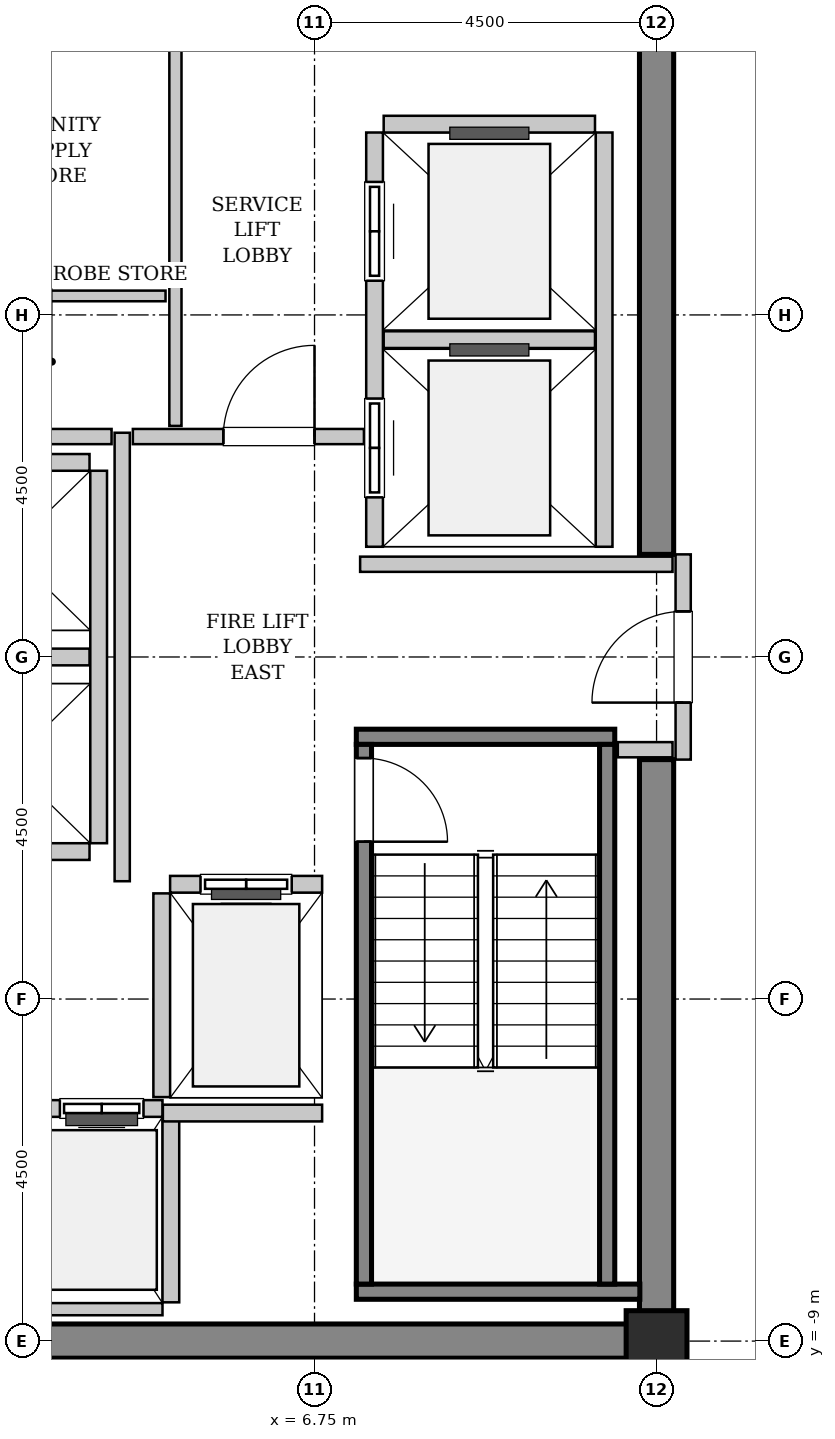
"""IFC4 building model, lengths in metres.
Left out: names, types, materials, properties, quantities, classifications, styles, units other than length and angle.
Written with IfcOpenShell. Run it as: python <this file> out.ifc"""

import sys

from ifc_helpers import new_model, si_unit, direction, frame, frame_2d, origin, origin_2d, place, context, subcontext, project, spatial, rectangle, hollow_rectangle, extrude, source, transform, mapped, element, fill, save


model = new_model("IFC4")
c1 = context("Model", 3, precision=1e-05, world=origin(), true_north=direction((0.0, 1.0)))
c2 = subcontext(c1, "Body", "Model", "MODEL_VIEW")
j1 = project(units=[si_unit("LENGTHUNIT", "METRE"), si_unit("PLANEANGLEUNIT", "RADIAN")], contexts=[c1])
p1 = place(None, origin())
s1 = spatial("IfcSite", under=j1, at=p1, CompositionType="ELEMENT")
p2 = place(p1, origin())
s2 = spatial("IfcBuilding", under=s1, at=p2, CompositionType="ELEMENT")
p3 = place(p2, frame((0.0, 0.0, 237.0)))
s3 = spatial("IfcBuildingStorey", under=s2, at=p3, CompositionType="ELEMENT", Elevation=237.0)
m1 = source(origin(), c2, "Body", "SweptSolid", [
    extrude(rectangle(XDim=9.925, YDim=0.45, at=frame_2d((4.962, 0.0))), origin(), (0.0, 0.0, 1.0), 3.8),
])
p4 = place(p3, frame((1.55, -9.0, 0.0), z_axis=(0.0, 0.0, 1.0), x_axis=(1.0, 0.0, 0.0)))
e1 = element("IfcWall", 1, at=p4, inside=s3, PredefinedType="SHEAR", context=c2, shape_type="MappedRepresentation", body=[
    mapped(m1, transform((0.0, 0.0, 0.0), x_axis=(1.0, 0.0, 0.0), y_axis=(0.0, 1.0, 0.0), z_axis=(0.0, 0.0, 1.0), scale=1.0)),
])
m2 = source(origin(), c2, "Body", "SweptSolid", [
    extrude(rectangle(XDim=7.425, YDim=0.45, at=frame_2d((3.712, 0.0))), origin(), (0.0, 0.0, 1.0), 3.8),
])
for number, where, z_axis, x_axis in (
    (2, (11.25, -8.775, 0.0), (0.0, 0.0, 1.0), (0.0, 1.0, 0.0)),
    (3, (11.25, 1.35, 0.0), (0.0, 0.0, 1.0), (0.0, 1.0, 0.0)),
):
    element("IfcWall", number, at=place(p3, frame(where, z_axis=z_axis, x_axis=x_axis)), inside=s3, PredefinedType="SHEAR", context=c2, shape_type="MappedRepresentation", body=[
        mapped(m2, transform((0.0, 0.0, 0.0), x_axis=(1.0, 0.0, 0.0), y_axis=(0.0, 1.0, 0.0), z_axis=(0.0, 0.0, 1.0), scale=1.0)),
    ])
m3 = source(origin(), c2, "Body", "SweptSolid", [
    extrude(hollow_rectangle(XDim=0.8, YDim=0.8, WallThickness=0.04, InnerFilletRadius=0.04, OuterFilletRadius=0.08, at=origin_2d()), origin(), (0.0, 0.0, 1.0), 3.8),
])
p5 = place(p3, frame((11.25, -9.0, 0.0), z_axis=(0.0, 0.0, 1.0), x_axis=(1.0, 0.0, 0.0)))
e4 = element("IfcColumn", 4, at=p5, inside=s3, PredefinedType="COLUMN", context=c2, shape_type="MappedRepresentation", body=[
    mapped(m3, transform((0.0, 0.0, 0.0), x_axis=(1.0, 0.0, 0.0), y_axis=(0.0, 1.0, 0.0), z_axis=(0.0, 0.0, 1.0), scale=1.0)),
])
m4 = source(origin(), c2, "Body", "SweptSolid", [
    extrude(rectangle(XDim=3.4, YDim=0.2, at=frame_2d((1.7, 0.0))), origin(), (0.0, 0.0, 1.0), 3.8),
])
p6 = place(p3, frame((7.3, -1.05, 0.0), z_axis=(0.0, 0.0, 1.0), x_axis=(1.0, 0.0, 0.0)))
e5 = element("IfcWall", 5, at=p6, inside=s3, PredefinedType="SOLIDWALL", context=c2, shape_type="MappedRepresentation", body=[
    mapped(m4, transform((0.0, 0.0, 0.0), x_axis=(1.0, 0.0, 0.0), y_axis=(0.0, 1.0, 0.0), z_axis=(0.0, 0.0, 1.0), scale=1.0)),
])
m5 = source(origin(), c2, "Body", "SweptSolid", [
    extrude(rectangle(XDim=3.73, YDim=0.2, at=frame_2d((1.865, 0.0))), origin(), (0.0, 0.0, 1.0), 3.8),
])
p7 = place(p3, frame((7.3, -8.35, 0.0), z_axis=(0.0, 0.0, 1.0), x_axis=(1.0, 0.0, 0.0)))
e6 = element("IfcWall", 6, at=p7, inside=s3, PredefinedType="SOLIDWALL", context=c2, shape_type="MappedRepresentation", body=[
    mapped(m5, transform((0.0, 0.0, 0.0), x_axis=(1.0, 0.0, 0.0), y_axis=(0.0, 1.0, 0.0), z_axis=(0.0, 0.0, 1.0), scale=1.0)),
])
m6 = source(origin(), c2, "Body", "SweptSolid", [
    extrude(rectangle(XDim=7.1, YDim=0.2, at=frame_2d((3.55, 0.0))), origin(), (0.0, 0.0, 1.0), 3.8),
])
p8 = place(p3, frame((7.4, -1.15, 0.0), z_axis=(0.0, 0.0, 1.0), x_axis=(0.0, -1.0, 0.0)))
e7 = element("IfcWall", 7, at=p8, inside=s3, PredefinedType="SOLIDWALL", context=c2, shape_type="MappedRepresentation", body=[
    mapped(m6, transform((0.0, 0.0, 0.0), x_axis=(1.0, 0.0, 0.0), y_axis=(0.0, 1.0, 0.0), z_axis=(0.0, 0.0, 1.0), scale=1.0)),
])
p9 = place(p8, frame((0.18, 0.0, 0.0)))
e8 = element("IfcOpeningElement", 8, at=p9, cuts=e7, PredefinedType="OPENING", context=c2, shape_type="SweptSolid", body=[
    extrude(rectangle(XDim=1.1, YDim=2.15, at=frame_2d((0.55, 1.075))), frame((0.0, 0.11, 0.0), z_axis=(0.0, -1.0, 0.0), x_axis=(1.0, 0.0, 0.0)), (0.0, 0.0, 1.0), 0.22),
])
p10 = place(p3, frame((10.6, -1.15, 0.0), z_axis=(0.0, 0.0, 1.0), x_axis=(0.0, -1.0, 0.0)))
e9 = element("IfcWall", 9, at=p10, inside=s3, PredefinedType="SOLIDWALL", context=c2, shape_type="MappedRepresentation", body=[
    mapped(m6, transform((0.0, 0.0, 0.0), x_axis=(1.0, 0.0, 0.0), y_axis=(0.0, 1.0, 0.0), z_axis=(0.0, 0.0, 1.0), scale=1.0)),
])
m7 = source(origin(), c2, "Body", "SweptSolid", [
    extrude(rectangle(XDim=2.0, YDim=0.22, at=frame_2d((1.0, 0.0))), origin(), (0.0, 0.0, 1.0), 3.535),
])
p11 = place(p3, frame((6.85, -2.99, 0.0), z_axis=(0.0, 0.0, 1.0), x_axis=(-1.0, 0.0, 0.0)))
e10 = element("IfcWall", 10, at=p11, inside=s3, PredefinedType="SOLIDWALL", context=c2, shape_type="MappedRepresentation", body=[
    mapped(m7, transform((0.0, 0.0, 0.0), x_axis=(1.0, 0.0, 0.0), y_axis=(0.0, 1.0, 0.0), z_axis=(0.0, 0.0, 1.0), scale=1.0)),
])
p12 = place(p11, frame((0.4, 0.0, 0.0)))
e11 = element("IfcOpeningElement", 11, at=p12, cuts=e10, PredefinedType="OPENING", context=c2, shape_type="SweptSolid", body=[
    extrude(rectangle(XDim=1.2, YDim=2.2, at=frame_2d((0.6, 1.1))), frame((0.0, 0.12, 0.0), z_axis=(0.0, -1.0, 0.0), x_axis=(1.0, 0.0, 0.0)), (0.0, 0.0, 1.0), 0.24),
])
m8 = source(origin(), c2, "Body", "SweptSolid", [
    extrude(rectangle(XDim=2.68, YDim=0.22, at=frame_2d((1.34, 0.0))), origin(), (0.0, 0.0, 1.0), 3.535),
])
p13 = place(p3, frame((4.74, -3.11, 0.0), z_axis=(0.0, 0.0, 1.0), x_axis=(0.0, -1.0, 0.0)))
e12 = element("IfcWall", 12, at=p13, inside=s3, PredefinedType="SOLIDWALL", context=c2, shape_type="MappedRepresentation", body=[
    mapped(m8, transform((0.0, 0.0, 0.0), x_axis=(1.0, 0.0, 0.0), y_axis=(0.0, 1.0, 0.0), z_axis=(0.0, 0.0, 1.0), scale=1.0)),
])
m9 = source(origin(), c2, "Body", "SweptSolid", [
    extrude(rectangle(XDim=5.45, YDim=0.22, at=frame_2d((2.725, 0.0))), origin(), (0.0, 0.0, 1.0), 3.535),
])
p14 = place(p3, frame((7.54, 6.9, 0.0), z_axis=(0.0, 0.0, 1.0), x_axis=(0.0, -1.0, 0.0)))
e13 = element("IfcWall", 13, at=p14, inside=s3, PredefinedType="SOLIDWALL", context=c2, shape_type="MappedRepresentation", body=[
    mapped(m9, transform((0.0, 0.0, 0.0), x_axis=(1.0, 0.0, 0.0), y_axis=(0.0, 1.0, 0.0), z_axis=(0.0, 0.0, 1.0), scale=1.0)),
])
p15 = place(p14, frame((3.5, 0.0, 0.0)))
e14 = element("IfcOpeningElement", 14, at=p15, cuts=e13, PredefinedType="OPENING", context=c2, shape_type="SweptSolid", body=[
    extrude(rectangle(XDim=1.3, YDim=2.3, at=frame_2d((0.65, 1.15))), frame((0.0, 0.12, 0.0), z_axis=(0.0, -1.0, 0.0), x_axis=(1.0, 0.0, 0.0)), (0.0, 0.0, 1.0), 0.24),
])
p16 = place(p14, frame((0.65, 0.0, 0.0)))
e15 = element("IfcOpeningElement", 15, at=p16, cuts=e13, PredefinedType="OPENING", context=c2, shape_type="SweptSolid", body=[
    extrude(rectangle(XDim=1.3, YDim=2.3, at=frame_2d((0.65, 1.15))), frame((0.0, 0.12, 0.0), z_axis=(0.0, -1.0, 0.0), x_axis=(1.0, 0.0, 0.0)), (0.0, 0.0, 1.0), 0.24),
])
p17 = place(p3, frame((10.56, 1.45, 0.0), z_axis=(0.0, 0.0, 1.0), x_axis=(0.0, 1.0, 0.0)))
e16 = element("IfcWall", 16, at=p17, inside=s3, PredefinedType="SOLIDWALL", context=c2, shape_type="MappedRepresentation", body=[
    mapped(m9, transform((0.0, 0.0, 0.0), x_axis=(1.0, 0.0, 0.0), y_axis=(0.0, 1.0, 0.0), z_axis=(0.0, 0.0, 1.0), scale=1.0)),
])
m10 = source(origin(), c2, "Body", "SweptSolid", [
    extrude(rectangle(XDim=2.78, YDim=0.22, at=frame_2d((1.39, 0.0))), origin(), (0.0, 0.0, 1.0), 3.535),
])
for number, where, z_axis, x_axis in (
    (17, (7.66, 4.175, 0.0), (0.0, 0.0, 1.0), (1.0, 0.0, 0.0)),
    (18, (10.44, 7.01, 0.0), (0.0, 0.0, 1.0), (-1.0, 0.0, 0.0)),
):
    element("IfcWall", number, at=place(p3, frame(where, z_axis=z_axis, x_axis=x_axis)), inside=s3, PredefinedType="SOLIDWALL", context=c2, shape_type="MappedRepresentation", body=[
        mapped(m10, transform((0.0, 0.0, 0.0), x_axis=(1.0, 0.0, 0.0), y_axis=(0.0, 1.0, 0.0), z_axis=(0.0, 0.0, 1.0), scale=1.0)),
    ])
m11 = source(origin(), c2, "Body", "SweptSolid", [
    extrude(rectangle(XDim=3.2, YDim=0.22, at=frame_2d((1.6, 0.0))), origin(), (0.0, 0.0, 1.0), 3.535),
])
p18 = place(p3, frame((4.75, -5.94, 0.0), z_axis=(0.0, 0.0, 1.0), x_axis=(-1.0, 0.0, 0.0)))
e19 = element("IfcWall", 19, at=p18, inside=s3, PredefinedType="SOLIDWALL", context=c2, shape_type="MappedRepresentation", body=[
    mapped(m11, transform((0.0, 0.0, 0.0), x_axis=(1.0, 0.0, 0.0), y_axis=(0.0, 1.0, 0.0), z_axis=(0.0, 0.0, 1.0), scale=1.0)),
])
p19 = place(p18, frame((1.875, 0.0, 0.0)))
e20 = element("IfcOpeningElement", 20, at=p19, cuts=e19, PredefinedType="OPENING", context=c2, shape_type="SweptSolid", body=[
    extrude(rectangle(XDim=1.1, YDim=2.2, at=frame_2d((0.55, 1.1))), frame((0.0, 0.12, 0.0), z_axis=(0.0, -1.0, 0.0), x_axis=(1.0, 0.0, 0.0)), (0.0, 0.0, 1.0), 0.24),
])
p20 = place(p18, frame((0.25, 0.0, 0.0)))
e21 = element("IfcOpeningElement", 21, at=p20, cuts=e19, PredefinedType="OPENING", context=c2, shape_type="SweptSolid", body=[
    extrude(rectangle(XDim=1.1, YDim=2.2, at=frame_2d((0.55, 1.1))), frame((0.0, 0.12, 0.0), z_axis=(0.0, -1.0, 0.0), x_axis=(1.0, 0.0, 0.0)), (0.0, 0.0, 1.0), 0.24),
])
m12 = source(origin(), c2, "Body", "SweptSolid", [
    extrude(rectangle(XDim=3.2, YDim=0.16, at=frame_2d((1.6, 0.0))), origin(), (0.0, 0.0, 1.0), 2.625),
])
p21 = place(p3, frame((1.55, -8.58, 0.0), z_axis=(0.0, 0.0, 1.0), x_axis=(1.0, 0.0, 0.0)))
e22 = element("IfcWall", 22, at=p21, inside=s3, PredefinedType="PARTITIONING", context=c2, shape_type="MappedRepresentation", body=[
    mapped(m12, transform((0.0, 0.0, 0.0), x_axis=(1.0, 0.0, 0.0), y_axis=(0.0, 1.0, 0.0), z_axis=(0.0, 0.0, 1.0), scale=1.0)),
])
m13 = source(origin(), c2, "Body", "SweptSolid", [
    extrude(rectangle(XDim=2.43, YDim=0.22, at=frame_2d((1.215, 0.0))), origin(), (0.0, 0.0, 1.0), 3.535),
])
p22 = place(p3, frame((4.86, -8.49, 0.0), z_axis=(0.0, 0.0, 1.0), x_axis=(0.0, 1.0, 0.0)))
e23 = element("IfcWall", 23, at=p22, inside=s3, PredefinedType="SOLIDWALL", context=c2, shape_type="MappedRepresentation", body=[
    mapped(m13, transform((0.0, 0.0, 0.0), x_axis=(1.0, 0.0, 0.0), y_axis=(0.0, 1.0, 0.0), z_axis=(0.0, 0.0, 1.0), scale=1.0)),
])
m14 = source(origin(), c2, "Body", "SweptSolid", [
    extrude(rectangle(XDim=4.9, YDim=0.22, at=frame_2d((2.45, 0.0))), origin(), (0.0, 0.0, 1.0), 3.535),
])
p23 = place(p3, frame((3.91, -2.45, 0.0), z_axis=(0.0, 0.0, 1.0), x_axis=(0.0, 1.0, 0.0)))
e24 = element("IfcWall", 24, at=p23, inside=s3, PredefinedType="SOLIDWALL", context=c2, shape_type="MappedRepresentation", body=[
    mapped(m14, transform((0.0, 0.0, 0.0), x_axis=(1.0, 0.0, 0.0), y_axis=(0.0, 1.0, 0.0), z_axis=(0.0, 0.0, 1.0), scale=1.0)),
])
m15 = source(origin(), c2, "Body", "SweptSolid", [
    extrude(rectangle(XDim=2.13, YDim=0.22, at=frame_2d((1.065, 0.0))), origin(), (0.0, 0.0, 1.0), 3.535),
])
for number, where, z_axis, x_axis in (
    (25, (1.66, -2.56, 0.0), (0.0, 0.0, 1.0), (1.0, 0.0, 0.0)),
    (26, (1.66, 0.0, 0.0), (0.0, 0.0, 1.0), (1.0, 0.0, 0.0)),
    (27, (3.79, 2.56, 0.0), (0.0, 0.0, 1.0), (-1.0, 0.0, 0.0)),
):
    element("IfcWall", number, at=place(p3, frame(where, z_axis=z_axis, x_axis=x_axis)), inside=s3, PredefinedType="SOLIDWALL", context=c2, shape_type="MappedRepresentation", body=[
        mapped(m15, transform((0.0, 0.0, 0.0), x_axis=(1.0, 0.0, 0.0), y_axis=(0.0, 1.0, 0.0), z_axis=(0.0, 0.0, 1.0), scale=1.0)),
    ])
m16 = source(origin(), c2, "Body", "SweptSolid", [
    extrude(rectangle(XDim=2.095, YDim=0.22, at=frame_2d((1.048, 0.0))), origin(), (0.0, 0.0, 1.0), 3.535),
])
p24 = place(p3, frame((4.755, -6.0, 0.0), z_axis=(0.0, 0.0, 1.0), x_axis=(1.0, 0.0, 0.0)))
e28 = element("IfcWall", 28, at=p24, inside=s3, PredefinedType="SOLIDWALL", context=c2, shape_type="MappedRepresentation", body=[
    mapped(m16, transform((0.0, 0.0, 0.0), x_axis=(1.0, 0.0, 0.0), y_axis=(0.0, 1.0, 0.0), z_axis=(0.0, 0.0, 1.0), scale=1.0)),
])
m17 = source(origin(), c2, "Body", "SweptSolid", [
    extrude(rectangle(XDim=2.7, YDim=0.2, at=frame_2d((1.35, 0.0))), origin(), (0.0, 0.0, 1.0), 2.625),
])
p25 = place(p3, frame((11.6, -1.35, 0.0), z_axis=(0.0, 0.0, 1.0), x_axis=(0.0, 1.0, 0.0)))
e29 = element("IfcWall", 29, at=p25, inside=s3, PredefinedType="PARTITIONING", context=c2, shape_type="MappedRepresentation", body=[
    mapped(m17, transform((0.0, 0.0, 0.0), x_axis=(1.0, 0.0, 0.0), y_axis=(0.0, 1.0, 0.0), z_axis=(0.0, 0.0, 1.0), scale=1.0)),
])
p26 = place(p25, frame((0.75, 0.0, 0.0)))
e30 = element("IfcOpeningElement", 30, at=p26, cuts=e29, PredefinedType="OPENING", context=c2, shape_type="SweptSolid", body=[
    extrude(rectangle(XDim=1.2, YDim=2.15, at=frame_2d((0.6, 1.075))), frame((0.0, 0.11, 0.0), z_axis=(0.0, -1.0, 0.0), x_axis=(1.0, 0.0, 0.0)), (0.0, 0.0, 1.0), 0.22),
])
m18 = source(origin(), c2, "Body", "SweptSolid", [
    extrude(rectangle(XDim=5.9, YDim=0.2, at=frame_2d((2.95, 0.0))), origin(), (0.0, 0.0, 1.0), 3.535),
])
p27 = place(p3, frame((4.22, -2.95, 0.0), z_axis=(0.0, 0.0, 1.0), x_axis=(0.0, 1.0, 0.0)))
e31 = element("IfcWall", 31, at=p27, inside=s3, PredefinedType="PARTITIONING", context=c2, shape_type="MappedRepresentation", body=[
    mapped(m18, transform((0.0, 0.0, 0.0), x_axis=(1.0, 0.0, 0.0), y_axis=(0.0, 1.0, 0.0), z_axis=(0.0, 0.0, 1.0), scale=1.0)),
])
m19 = source(origin(), c2, "Body", "SweptSolid", [
    extrude(rectangle(XDim=2.52, YDim=0.2, at=frame_2d((1.26, 0.0))), origin(), (0.0, 0.0, 1.0), 3.535),
])
p28 = place(p3, frame((1.56, 2.9, 0.0), z_axis=(0.0, 0.0, 1.0), x_axis=(1.0, 0.0, 0.0)))
e32 = element("IfcWall", 32, at=p28, inside=s3, PredefinedType="PARTITIONING", context=c2, shape_type="MappedRepresentation", body=[
    mapped(m19, transform((0.0, 0.0, 0.0), x_axis=(1.0, 0.0, 0.0), y_axis=(0.0, 1.0, 0.0), z_axis=(0.0, 0.0, 1.0), scale=1.0)),
])
m20 = source(origin(), c2, "Body", "SweptSolid", [
    extrude(rectangle(XDim=3.04, YDim=0.2, at=frame_2d((1.52, 0.0))), origin(), (0.0, 0.0, 1.0), 3.535),
])
p29 = place(p3, frame((4.36, 2.9, 0.0), z_axis=(0.0, 0.0, 1.0), x_axis=(1.0, 0.0, 0.0)))
e33 = element("IfcWall", 33, at=p29, inside=s3, PredefinedType="PARTITIONING", context=c2, shape_type="MappedRepresentation", body=[
    mapped(m20, transform((0.0, 0.0, 0.0), x_axis=(1.0, 0.0, 0.0), y_axis=(0.0, 1.0, 0.0), z_axis=(0.0, 0.0, 1.0), scale=1.0)),
])
p30 = place(p29, frame((1.19, 0.0, 0.0)))
e34 = element("IfcOpeningElement", 34, at=p30, cuts=e33, PredefinedType="OPENING", context=c2, shape_type="SweptSolid", body=[
    extrude(rectangle(XDim=1.2, YDim=2.15, at=frame_2d((0.6, 1.075))), frame((0.0, 0.11, 0.0), z_axis=(0.0, -1.0, 0.0), x_axis=(1.0, 0.0, 0.0)), (0.0, 0.0, 1.0), 0.22),
])
m21 = source(origin(), c2, "Body", "SweptSolid", [
    extrude(rectangle(XDim=4.11, YDim=0.2, at=frame_2d((2.055, 0.0))), origin(), (0.0, 0.0, 1.0), 3.535),
])
p31 = place(p3, frame((7.35, 1.22, 0.0), z_axis=(0.0, 0.0, 1.0), x_axis=(1.0, 0.0, 0.0)))
e35 = element("IfcWall", 35, at=p31, inside=s3, PredefinedType="PARTITIONING", context=c2, shape_type="MappedRepresentation", body=[
    mapped(m21, transform((0.0, 0.0, 0.0), x_axis=(1.0, 0.0, 0.0), y_axis=(0.0, 1.0, 0.0), z_axis=(0.0, 0.0, 1.0), scale=1.0)),
])
m22 = source(origin(), c2, "Body", "SweptSolid", [
    extrude(rectangle(XDim=0.72, YDim=0.2, at=frame_2d((0.36, 0.0))), origin(), (0.0, 0.0, 1.0), 3.535),
])
p32 = place(p3, frame((10.74, -1.22, 0.0), z_axis=(0.0, 0.0, 1.0), x_axis=(1.0, 0.0, 0.0)))
e36 = element("IfcWall", 36, at=p32, inside=s3, PredefinedType="PARTITIONING", context=c2, shape_type="MappedRepresentation", body=[
    mapped(m22, transform((0.0, 0.0, 0.0), x_axis=(1.0, 0.0, 0.0), y_axis=(0.0, 1.0, 0.0), z_axis=(0.0, 0.0, 1.0), scale=1.0)),
])
m23 = source(origin(), c2, "Body", "SweptSolid", [
    extrude(rectangle(XDim=5.45, YDim=0.16, at=frame_2d((2.725, 0.0))), origin(), (0.0, 0.0, 1.0), 3.535),
])
p33 = place(p3, frame((4.92, 3.04, 0.0), z_axis=(0.0, 0.0, 1.0), x_axis=(0.0, 1.0, 0.0)))
e37 = element("IfcWall", 37, at=p33, inside=s3, PredefinedType="PARTITIONING", context=c2, shape_type="MappedRepresentation", body=[
    mapped(m23, transform((0.0, 0.0, 0.0), x_axis=(1.0, 0.0, 0.0), y_axis=(0.0, 1.0, 0.0), z_axis=(0.0, 0.0, 1.0), scale=1.0)),
])
m24 = source(origin(), c2, "Body", "SweptSolid", [
    extrude(rectangle(XDim=3.15, YDim=0.14, at=frame_2d((1.575, 0.0))), origin(), (0.0, 0.0, 1.0), 3.535),
])
p34 = place(p3, frame((1.64, 4.75, 0.0), z_axis=(0.0, 0.0, 1.0), x_axis=(1.0, 0.0, 0.0)))
e38 = element("IfcWall", 38, at=p34, inside=s3, PredefinedType="PARTITIONING", context=c2, shape_type="MappedRepresentation", body=[
    mapped(m24, transform((0.0, 0.0, 0.0), x_axis=(1.0, 0.0, 0.0), y_axis=(0.0, 1.0, 0.0), z_axis=(0.0, 0.0, 1.0), scale=1.0)),
])
m25 = source(origin(), c2, "Body", "SweptSolid", [
    extrude(rectangle(XDim=1.1, YDim=2.15, at=frame_2d((0.55, 1.075))), frame((0.0, 0.025, 0.0), z_axis=(0.0, -1.0, 0.0), x_axis=(1.0, 0.0, 0.0)), (0.0, 0.0, 1.0), 0.05),
])
p35 = place(p9, origin())
e39 = element("IfcDoor", 39, at=p35, inside=s3, OperationType="SINGLE_SWING_RIGHT", PredefinedType="DOOR", context=c2, shape_type="MappedRepresentation", body=[
    mapped(m25, transform((0.0, 0.0, 0.0), x_axis=(1.0, 0.0, 0.0), y_axis=(0.0, 1.0, 0.0), z_axis=(0.0, 0.0, 1.0), scale=1.0)),
])
fill(e8, e39)
m26 = source(origin(), c2, "Body", "SweptSolid", [
    extrude(rectangle(XDim=1.2, YDim=2.2, at=frame_2d((0.6, 1.1))), frame((0.0, 0.025, 0.0), z_axis=(0.0, -1.0, 0.0), x_axis=(1.0, 0.0, 0.0)), (0.0, 0.0, 1.0), 0.05),
])
p36 = place(p12, origin())
e40 = element("IfcDoor", 40, at=p36, inside=s3, OperationType="SLIDING_TO_LEFT", PredefinedType="DOOR", context=c2, shape_type="MappedRepresentation", body=[
    mapped(m26, transform((0.0, 0.0, 0.0), x_axis=(1.0, 0.0, 0.0), y_axis=(0.0, 1.0, 0.0), z_axis=(0.0, 0.0, 1.0), scale=1.0)),
])
fill(e11, e40)
m27 = source(origin(), c2, "Body", "SweptSolid", [
    extrude(rectangle(XDim=1.3, YDim=2.3, at=frame_2d((0.65, 1.15))), frame((0.0, 0.025, 0.0), z_axis=(0.0, -1.0, 0.0), x_axis=(1.0, 0.0, 0.0)), (0.0, 0.0, 1.0), 0.05),
])
p37 = place(p15, origin())
e41 = element("IfcDoor", 41, at=p37, inside=s3, OperationType="SLIDING_TO_RIGHT", PredefinedType="DOOR", context=c2, shape_type="MappedRepresentation", body=[
    mapped(m27, transform((0.0, 0.0, 0.0), x_axis=(1.0, 0.0, 0.0), y_axis=(0.0, 1.0, 0.0), z_axis=(0.0, 0.0, 1.0), scale=1.0)),
])
fill(e14, e41)
p38 = place(p16, origin())
e42 = element("IfcDoor", 42, at=p38, inside=s3, OperationType="SLIDING_TO_RIGHT", PredefinedType="DOOR", context=c2, shape_type="MappedRepresentation", body=[
    mapped(m27, transform((0.0, 0.0, 0.0), x_axis=(1.0, 0.0, 0.0), y_axis=(0.0, 1.0, 0.0), z_axis=(0.0, 0.0, 1.0), scale=1.0)),
])
fill(e15, e42)
m28 = source(origin(), c2, "Body", "SweptSolid", [
    extrude(rectangle(XDim=1.1, YDim=2.2, at=frame_2d((0.55, 1.1))), frame((0.0, 0.025, 0.0), z_axis=(0.0, -1.0, 0.0), x_axis=(1.0, 0.0, 0.0)), (0.0, 0.0, 1.0), 0.05),
])
p39 = place(p20, origin())
e43 = element("IfcDoor", 43, at=p39, inside=s3, OperationType="DOUBLE_DOOR_SLIDING", PredefinedType="DOOR", context=c2, shape_type="MappedRepresentation", body=[
    mapped(m28, transform((0.0, 0.0, 0.0), x_axis=(1.0, 0.0, 0.0), y_axis=(0.0, 1.0, 0.0), z_axis=(0.0, 0.0, 1.0), scale=1.0)),
])
fill(e21, e43)
m29 = source(origin(), c2, "Body", "SweptSolid", [
    extrude(rectangle(XDim=1.2, YDim=2.15, at=frame_2d((0.6, 1.075))), frame((0.0, 0.025, 0.0), z_axis=(0.0, -1.0, 0.0), x_axis=(1.0, 0.0, 0.0)), (0.0, 0.0, 1.0), 0.05),
])
p40 = place(p26, origin())
e44 = element("IfcDoor", 44, at=p40, inside=s3, OperationType="SINGLE_SWING_LEFT", PredefinedType="DOOR", context=c2, shape_type="MappedRepresentation", body=[
    mapped(m29, transform((0.0, 0.0, 0.0), x_axis=(1.0, 0.0, 0.0), y_axis=(0.0, 1.0, 0.0), z_axis=(0.0, 0.0, 1.0), scale=1.0)),
])
fill(e30, e44)
p41 = place(p30, origin())
e45 = element("IfcDoor", 45, at=p41, inside=s3, OperationType="SINGLE_SWING_RIGHT", PredefinedType="DOOR", context=c2, shape_type="MappedRepresentation", body=[
    mapped(m29, transform((0.0, 0.0, 0.0), x_axis=(1.0, 0.0, 0.0), y_axis=(0.0, 1.0, 0.0), z_axis=(0.0, 0.0, 1.0), scale=1.0)),
])
fill(e34, e45)
save(model, sys.argv[1])
